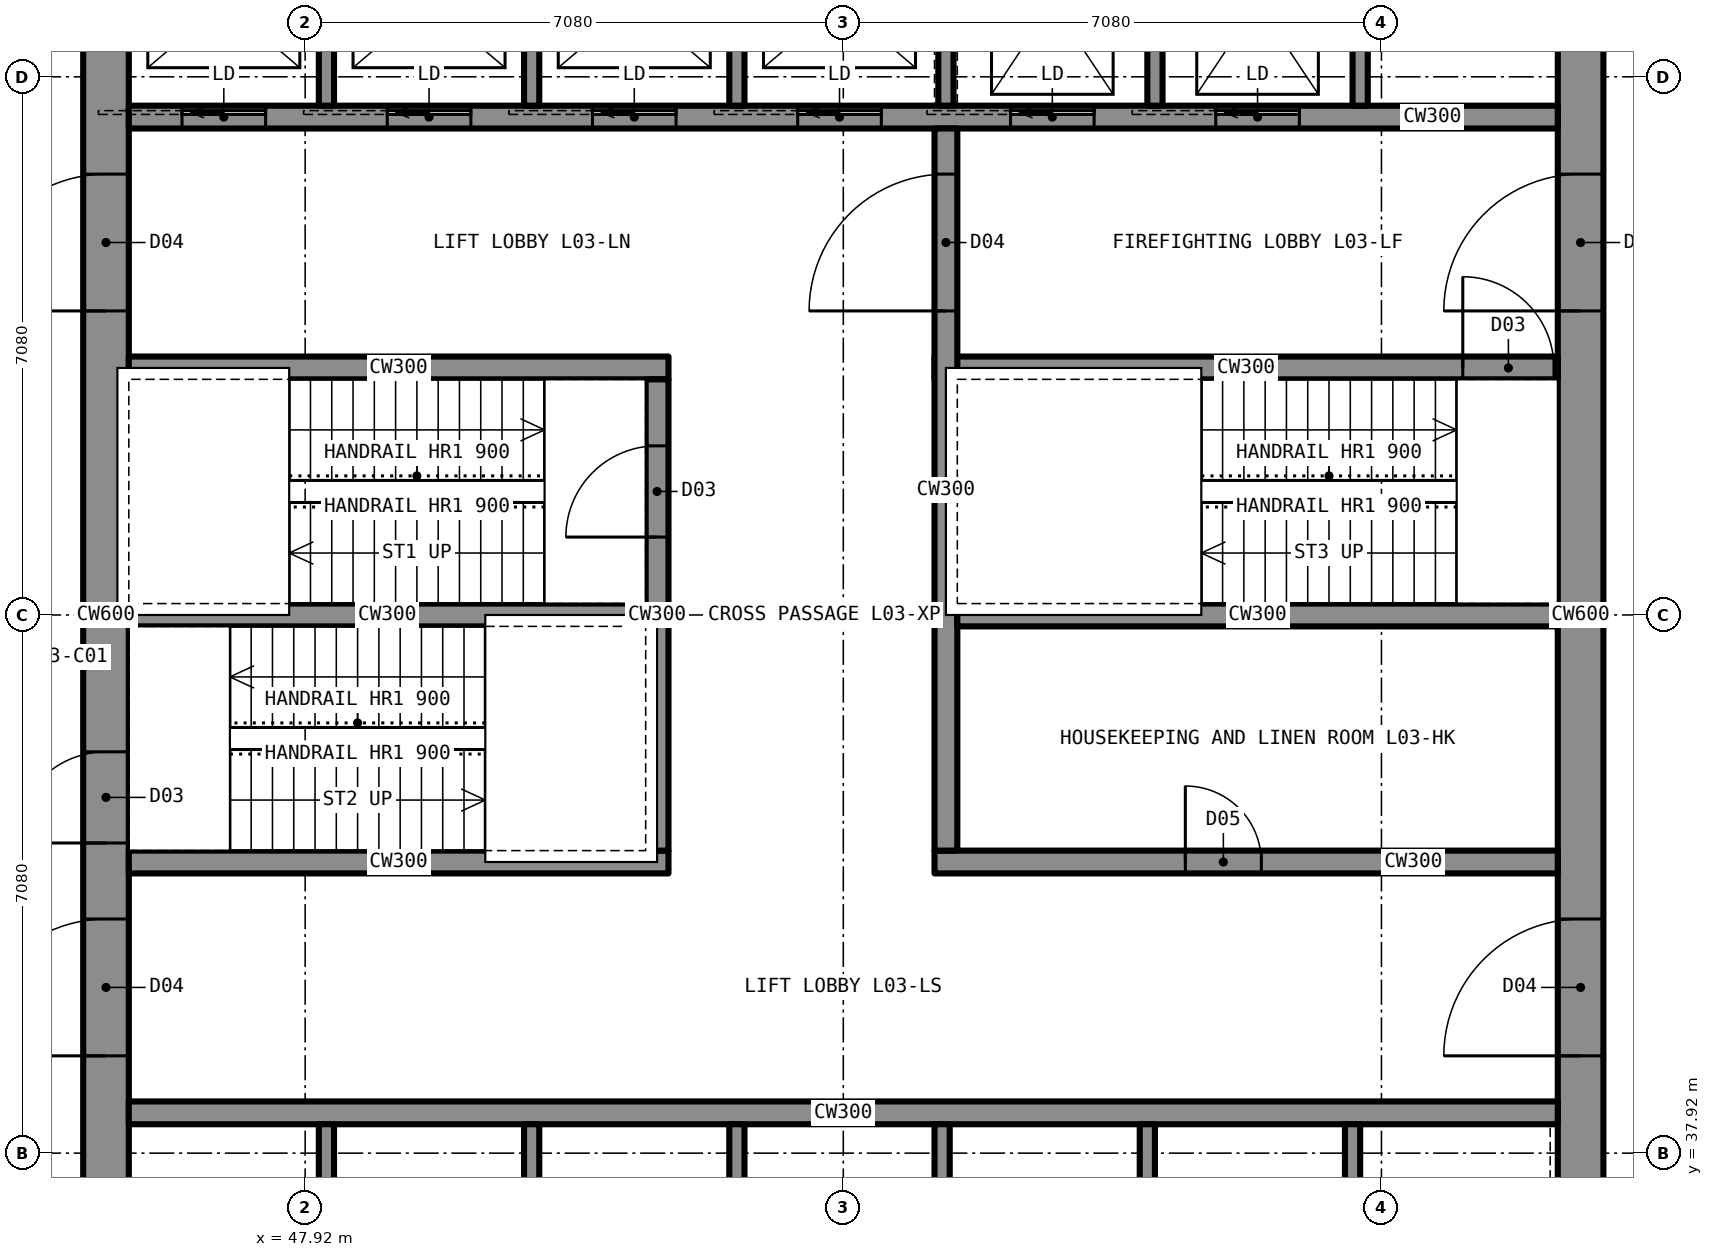
"""IFC4 building model, lengths in metres.
Left out: names, types, materials, properties, quantities, classifications, styles, units other than length and angle.
Written with IfcOpenShell. Run it as: python <this file> out.ifc"""

import sys

from ifc_helpers import new_model, si_unit, direction, frame, frame_2d, origin, place, context, subcontext, project, spatial, rectangle, extrude, element, fill, save


model = new_model("IFC4")
c1 = context("Model", 3, precision=1e-05, world=origin(), true_north=direction((0.0, 1.0)))
c2 = subcontext(c1, "Body", "Model", "MODEL_VIEW")
j1 = project(units=[si_unit("LENGTHUNIT", "METRE"), si_unit("PLANEANGLEUNIT", "RADIAN")], contexts=[c1])
p1 = place(None, origin())
s1 = spatial("IfcSite", under=j1, at=p1, CompositionType="ELEMENT")
p2 = place(p1, origin())
s2 = spatial("IfcBuilding", under=s1, at=p2, CompositionType="ELEMENT")
p3 = place(p2, frame((0.0, 0.0, 16.0)))
s3 = spatial("IfcBuildingStorey", under=s2, at=p3, CompositionType="ELEMENT", Elevation=16.0)
p4 = place(p3, frame((64.7, 35.6, 0.0), z_axis=(0.0, 0.0, 1.0), x_axis=(0.0, 1.0, 0.0)))
e1 = element("IfcWall", 1, at=p4, inside=s3, PredefinedType="SHEAR", context=c2, shape_type="SweptSolid", body=[
    extrude(rectangle(XDim=18.8, YDim=0.6, at=frame_2d((9.4, 0.0))), origin(), (0.0, 0.0, 1.0), 4.5),
])
p5 = place(p4, frame((13.4, 0.0, 0.0)))
e2 = element("IfcOpeningElement", 2, at=p5, cuts=e1, PredefinedType="OPENING", context=c2, shape_type="SweptSolid", body=[
    extrude(rectangle(XDim=1.8, YDim=2.2, at=frame_2d((0.9, 1.1))), frame((0.0, 0.31, 0.0), z_axis=(0.0, -1.0, 0.0), x_axis=(1.0, 0.0, 0.0)), (0.0, 0.0, 1.0), 0.62),
])
p6 = place(p4, frame((3.6, 0.0, 0.0)))
e3 = element("IfcOpeningElement", 3, at=p6, cuts=e1, PredefinedType="OPENING", context=c2, shape_type="SweptSolid", body=[
    extrude(rectangle(XDim=1.8, YDim=2.2, at=frame_2d((0.9, 1.1))), frame((0.0, 0.31, 0.0), z_axis=(0.0, -1.0, 0.0), x_axis=(1.0, 0.0, 0.0)), (0.0, 0.0, 1.0), 0.62),
])
p7 = place(p3, frame((45.3, 35.6, 0.0), z_axis=(0.0, 0.0, 1.0), x_axis=(0.0, 1.0, 0.0)))
e4 = element("IfcWall", 4, at=p7, inside=s3, PredefinedType="SHEAR", context=c2, shape_type="SweptSolid", body=[
    extrude(rectangle(XDim=18.8, YDim=0.6, at=frame_2d((9.4, 0.0))), origin(), (0.0, 0.0, 1.0), 4.5),
])
p8 = place(p7, frame((13.4, 0.0, 0.0)))
e5 = element("IfcOpeningElement", 5, at=p8, cuts=e4, PredefinedType="OPENING", context=c2, shape_type="SweptSolid", body=[
    extrude(rectangle(XDim=1.8, YDim=2.2, at=frame_2d((0.9, 1.1))), frame((0.0, 0.31, 0.0), z_axis=(0.0, -1.0, 0.0), x_axis=(1.0, 0.0, 0.0)), (0.0, 0.0, 1.0), 0.62),
])
p9 = place(p7, frame((3.6, 0.0, 0.0)))
e6 = element("IfcOpeningElement", 6, at=p9, cuts=e4, PredefinedType="OPENING", context=c2, shape_type="SweptSolid", body=[
    extrude(rectangle(XDim=1.8, YDim=2.2, at=frame_2d((0.9, 1.1))), frame((0.0, 0.31, 0.0), z_axis=(0.0, -1.0, 0.0), x_axis=(1.0, 0.0, 0.0)), (0.0, 0.0, 1.0), 0.62),
])
p10 = place(p7, frame((6.4, 0.0, 0.0)))
e7 = element("IfcOpeningElement", 7, at=p10, cuts=e4, PredefinedType="OPENING", context=c2, shape_type="SweptSolid", body=[
    extrude(rectangle(XDim=1.2, YDim=2.2, at=frame_2d((0.6, 1.1))), frame((0.0, 0.31, 0.0), z_axis=(0.0, -1.0, 0.0), x_axis=(1.0, 0.0, 0.0)), (0.0, 0.0, 1.0), 0.62),
])
p11 = place(p3, frame((45.6, 51.55, 0.0), z_axis=(0.0, 0.0, 1.0), x_axis=(1.0, 0.0, 0.0)))
e8 = element("IfcWall", 8, at=p11, inside=s3, PredefinedType="SHEAR", context=c2, shape_type="SweptSolid", body=[
    extrude(rectangle(XDim=18.8, YDim=0.3, at=frame_2d((9.4, 0.0))), origin(), (0.0, 0.0, 1.0), 4.5),
])
p12 = place(p11, frame((0.7, 0.0, 0.0)))
e9 = element("IfcOpeningElement", 9, at=p12, cuts=e8, PredefinedType="OPENING", context=c2, shape_type="SweptSolid", body=[
    extrude(rectangle(XDim=1.1, YDim=2.2, at=frame_2d((0.55, 1.1))), frame((0.0, 0.16, 0.0), z_axis=(0.0, -1.0, 0.0), x_axis=(1.0, 0.0, 0.0)), (0.0, 0.0, 1.0), 0.32),
])
p13 = place(p11, frame((3.4, 0.0, 0.0)))
e10 = element("IfcOpeningElement", 10, at=p13, cuts=e8, PredefinedType="OPENING", context=c2, shape_type="SweptSolid", body=[
    extrude(rectangle(XDim=1.1, YDim=2.2, at=frame_2d((0.55, 1.1))), frame((0.0, 0.16, 0.0), z_axis=(0.0, -1.0, 0.0), x_axis=(1.0, 0.0, 0.0)), (0.0, 0.0, 1.0), 0.32),
])
p14 = place(p11, frame((6.1, 0.0, 0.0)))
e11 = element("IfcOpeningElement", 11, at=p14, cuts=e8, PredefinedType="OPENING", context=c2, shape_type="SweptSolid", body=[
    extrude(rectangle(XDim=1.1, YDim=2.2, at=frame_2d((0.55, 1.1))), frame((0.0, 0.16, 0.0), z_axis=(0.0, -1.0, 0.0), x_axis=(1.0, 0.0, 0.0)), (0.0, 0.0, 1.0), 0.32),
])
p15 = place(p11, frame((8.8, 0.0, 0.0)))
e12 = element("IfcOpeningElement", 12, at=p15, cuts=e8, PredefinedType="OPENING", context=c2, shape_type="SweptSolid", body=[
    extrude(rectangle(XDim=1.1, YDim=2.2, at=frame_2d((0.55, 1.1))), frame((0.0, 0.16, 0.0), z_axis=(0.0, -1.0, 0.0), x_axis=(1.0, 0.0, 0.0)), (0.0, 0.0, 1.0), 0.32),
])
p16 = place(p11, frame((11.6, 0.0, 0.0)))
e13 = element("IfcOpeningElement", 13, at=p16, cuts=e8, PredefinedType="OPENING", context=c2, shape_type="SweptSolid", body=[
    extrude(rectangle(XDim=1.1, YDim=2.2, at=frame_2d((0.55, 1.1))), frame((0.0, 0.16, 0.0), z_axis=(0.0, -1.0, 0.0), x_axis=(1.0, 0.0, 0.0)), (0.0, 0.0, 1.0), 0.32),
])
p17 = place(p11, frame((14.3, 0.0, 0.0)))
e14 = element("IfcOpeningElement", 14, at=p17, cuts=e8, PredefinedType="OPENING", context=c2, shape_type="SweptSolid", body=[
    extrude(rectangle(XDim=1.1, YDim=2.2, at=frame_2d((0.55, 1.1))), frame((0.0, 0.16, 0.0), z_axis=(0.0, -1.0, 0.0), x_axis=(1.0, 0.0, 0.0)), (0.0, 0.0, 1.0), 0.32),
])
p18 = place(p3, frame((45.6, 38.45, 0.0), z_axis=(0.0, 0.0, 1.0), x_axis=(1.0, 0.0, 0.0)))
e15 = element("IfcWall", 15, at=p18, inside=s3, PredefinedType="SHEAR", context=c2, shape_type="SweptSolid", body=[
    extrude(rectangle(XDim=18.8, YDim=0.3, at=frame_2d((9.4, 0.0))), origin(), (0.0, 0.0, 1.0), 4.5),
])
p19 = place(p3, frame((45.6, 48.25, 0.0), z_axis=(0.0, 0.0, 1.0), x_axis=(1.0, 0.0, 0.0)))
e16 = element("IfcWall", 16, at=p19, inside=s3, PredefinedType="SHEAR", context=c2, shape_type="SweptSolid", body=[
    extrude(rectangle(XDim=7.1, YDim=0.3, at=frame_2d((3.55, 0.0))), origin(), (0.0, 0.0, 1.0), 4.5),
])
p20 = place(p3, frame((56.2, 48.25, 0.0), z_axis=(0.0, 0.0, 1.0), x_axis=(1.0, 0.0, 0.0)))
e17 = element("IfcWall", 17, at=p20, inside=s3, PredefinedType="SHEAR", context=c2, shape_type="SweptSolid", body=[
    extrude(rectangle(XDim=8.2, YDim=0.3, at=frame_2d((4.1, 0.0))), origin(), (0.0, 0.0, 1.0), 4.5),
])
p21 = place(p20, frame((6.95, 0.0, 0.0)))
e18 = element("IfcOpeningElement", 18, at=p21, cuts=e17, PredefinedType="OPENING", context=c2, shape_type="SweptSolid", body=[
    extrude(rectangle(XDim=1.2, YDim=2.2, at=frame_2d((0.6, 1.1))), frame((0.0, 0.16, 0.0), z_axis=(0.0, -1.0, 0.0), x_axis=(1.0, 0.0, 0.0)), (0.0, 0.0, 1.0), 0.32),
])
p22 = place(p3, frame((45.6, 41.75, 0.0), z_axis=(0.0, 0.0, 1.0), x_axis=(1.0, 0.0, 0.0)))
e19 = element("IfcWall", 19, at=p22, inside=s3, PredefinedType="SHEAR", context=c2, shape_type="SweptSolid", body=[
    extrude(rectangle(XDim=7.1, YDim=0.3, at=frame_2d((3.55, 0.0))), origin(), (0.0, 0.0, 1.0), 4.5),
])
p23 = place(p3, frame((56.2, 41.75, 0.0), z_axis=(0.0, 0.0, 1.0), x_axis=(1.0, 0.0, 0.0)))
e20 = element("IfcWall", 20, at=p23, inside=s3, PredefinedType="SHEAR", context=c2, shape_type="SweptSolid", body=[
    extrude(rectangle(XDim=8.2, YDim=0.3, at=frame_2d((4.1, 0.0))), origin(), (0.0, 0.0, 1.0), 4.5),
])
p24 = place(p23, frame((3.3, 0.0, 0.0)))
e21 = element("IfcOpeningElement", 21, at=p24, cuts=e20, PredefinedType="OPENING", context=c2, shape_type="SweptSolid", body=[
    extrude(rectangle(XDim=1.0, YDim=2.1, at=frame_2d((0.5, 1.05))), frame((0.0, 0.16, 0.0), z_axis=(0.0, -1.0, 0.0), x_axis=(1.0, 0.0, 0.0)), (0.0, 0.0, 1.0), 0.32),
])
p25 = place(p3, frame((52.55, 41.9, 0.0), z_axis=(0.0, 0.0, 1.0), x_axis=(0.0, 1.0, 0.0)))
e22 = element("IfcWall", 22, at=p25, inside=s3, PredefinedType="SHEAR", context=c2, shape_type="SweptSolid", body=[
    extrude(rectangle(XDim=6.2, YDim=0.3, at=frame_2d((3.1, 0.0))), origin(), (0.0, 0.0, 1.0), 4.5),
])
p26 = place(p25, frame((4.125, 0.0, 0.0)))
e23 = element("IfcOpeningElement", 23, at=p26, cuts=e22, PredefinedType="OPENING", context=c2, shape_type="SweptSolid", body=[
    extrude(rectangle(XDim=1.2, YDim=2.2, at=frame_2d((0.6, 1.1))), frame((0.0, 0.16, 0.0), z_axis=(0.0, -1.0, 0.0), x_axis=(1.0, 0.0, 0.0)), (0.0, 0.0, 1.0), 0.32),
])
p27 = place(p3, frame((56.35, 41.9, 0.0), z_axis=(0.0, 0.0, 1.0), x_axis=(0.0, 1.0, 0.0)))
e24 = element("IfcWall", 24, at=p27, inside=s3, PredefinedType="SHEAR", context=c2, shape_type="SweptSolid", body=[
    extrude(rectangle(XDim=9.5, YDim=0.3, at=frame_2d((4.75, 0.0))), origin(), (0.0, 0.0, 1.0), 4.5),
])
p28 = place(p27, frame((7.1, 0.0, 0.0)))
e25 = element("IfcOpeningElement", 25, at=p28, cuts=e24, PredefinedType="OPENING", context=c2, shape_type="SweptSolid", body=[
    extrude(rectangle(XDim=1.8, YDim=2.2, at=frame_2d((0.9, 1.1))), frame((0.0, 0.16, 0.0), z_axis=(0.0, -1.0, 0.0), x_axis=(1.0, 0.0, 0.0)), (0.0, 0.0, 1.0), 0.32),
])
p29 = place(p3, frame((45.6, 45.0, 0.0), z_axis=(0.0, 0.0, 1.0), x_axis=(1.0, 0.0, 0.0)))
e26 = element("IfcWall", 26, at=p29, inside=s3, PredefinedType="SHEAR", context=c2, shape_type="SweptSolid", body=[
    extrude(rectangle(XDim=6.8, YDim=0.3, at=frame_2d((3.4, 0.0))), origin(), (0.0, 0.0, 1.0), 4.5),
])
p30 = place(p3, frame((56.5, 45.0, 0.0), z_axis=(0.0, 0.0, 1.0), x_axis=(1.0, 0.0, 0.0)))
e27 = element("IfcWall", 27, at=p30, inside=s3, PredefinedType="SHEAR", context=c2, shape_type="SweptSolid", body=[
    extrude(rectangle(XDim=7.9, YDim=0.3, at=frame_2d((3.95, 0.0))), origin(), (0.0, 0.0, 1.0), 4.5),
])
for number, where, z_axis, x_axis in (
    (28, (48.2, 51.7, 0.0), (0.0, 0.0, 1.0), (0.0, 1.0, 0.0)),
    (29, (50.9, 51.7, 0.0), (0.0, 0.0, 1.0), (0.0, 1.0, 0.0)),
    (30, (53.6, 51.7, 0.0), (0.0, 0.0, 1.0), (0.0, 1.0, 0.0)),
    (31, (59.1, 51.7, 0.0), (0.0, 0.0, 1.0), (0.0, 1.0, 0.0)),
    (32, (61.8, 51.7, 0.0), (0.0, 0.0, 1.0), (0.0, 1.0, 0.0)),
    (33, (56.35, 51.7, 0.0), (0.0, 0.0, 1.0), (0.0, 1.0, 0.0)),
    (34, (48.2, 35.6, 0.0), (0.0, 0.0, 1.0), (0.0, 1.0, 0.0)),
    (35, (50.9, 35.6, 0.0), (0.0, 0.0, 1.0), (0.0, 1.0, 0.0)),
    (36, (53.6, 35.6, 0.0), (0.0, 0.0, 1.0), (0.0, 1.0, 0.0)),
    (37, (56.3, 35.6, 0.0), (0.0, 0.0, 1.0), (0.0, 1.0, 0.0)),
    (38, (59.0, 35.6, 0.0), (0.0, 0.0, 1.0), (0.0, 1.0, 0.0)),
    (39, (61.7, 35.6, 0.0), (0.0, 0.0, 1.0), (0.0, 1.0, 0.0)),
):
    element("IfcWall", number, at=place(p3, frame(where, z_axis=z_axis, x_axis=x_axis)), inside=s3, PredefinedType="PARTITIONING", context=c2, shape_type="SweptSolid", body=[
        extrude(rectangle(XDim=2.7, YDim=0.2, at=frame_2d((1.35, 0.0))), origin(), (0.0, 0.0, 1.0), 4.15),
    ])
p31 = place(p8, origin())
e40 = element("IfcDoor", 40, at=p31, inside=s3, OperationType="DOUBLE_DOOR_SINGLE_SWING", PredefinedType="DOOR", context=c2, shape_type="SweptSolid", body=[
    extrude(rectangle(XDim=1.8, YDim=2.2, at=frame_2d((0.9, 1.1))), frame((0.0, 0.025, 0.0), z_axis=(0.0, -1.0, 0.0), x_axis=(1.0, 0.0, 0.0)), (0.0, 0.0, 1.0), 0.05),
])
fill(e5, e40)
p32 = place(p9, origin())
e41 = element("IfcDoor", 41, at=p32, inside=s3, OperationType="DOUBLE_DOOR_SINGLE_SWING", PredefinedType="DOOR", context=c2, shape_type="SweptSolid", body=[
    extrude(rectangle(XDim=1.8, YDim=2.2, at=frame_2d((0.9, 1.1))), frame((0.0, 0.025, 0.0), z_axis=(0.0, -1.0, 0.0), x_axis=(1.0, 0.0, 0.0)), (0.0, 0.0, 1.0), 0.05),
])
fill(e6, e41)
p33 = place(p5, origin())
e42 = element("IfcDoor", 42, at=p33, inside=s3, OperationType="DOUBLE_DOOR_SINGLE_SWING", PredefinedType="DOOR", context=c2, shape_type="SweptSolid", body=[
    extrude(rectangle(XDim=1.8, YDim=2.2, at=frame_2d((0.9, 1.1))), frame((0.0, 0.025, 0.0), z_axis=(0.0, -1.0, 0.0), x_axis=(1.0, 0.0, 0.0)), (0.0, 0.0, 1.0), 0.05),
])
fill(e2, e42)
p34 = place(p6, origin())
e43 = element("IfcDoor", 43, at=p34, inside=s3, OperationType="DOUBLE_DOOR_SINGLE_SWING", PredefinedType="DOOR", context=c2, shape_type="SweptSolid", body=[
    extrude(rectangle(XDim=1.8, YDim=2.2, at=frame_2d((0.9, 1.1))), frame((0.0, 0.025, 0.0), z_axis=(0.0, -1.0, 0.0), x_axis=(1.0, 0.0, 0.0)), (0.0, 0.0, 1.0), 0.05),
])
fill(e3, e43)
p35 = place(p28, origin())
e44 = element("IfcDoor", 44, at=p35, inside=s3, OperationType="DOUBLE_DOOR_SINGLE_SWING", PredefinedType="DOOR", context=c2, shape_type="SweptSolid", body=[
    extrude(rectangle(XDim=1.8, YDim=2.2, at=frame_2d((0.9, 1.1))), frame((0.0, 0.025, 0.0), z_axis=(0.0, -1.0, 0.0), x_axis=(1.0, 0.0, 0.0)), (0.0, 0.0, 1.0), 0.05),
])
fill(e25, e44)
p36 = place(p26, origin())
e45 = element("IfcDoor", 45, at=p36, inside=s3, OperationType="SINGLE_SWING_LEFT", PredefinedType="DOOR", context=c2, shape_type="SweptSolid", body=[
    extrude(rectangle(XDim=1.2, YDim=2.2, at=frame_2d((0.6, 1.1))), frame((0.0, 0.025, 0.0), z_axis=(0.0, -1.0, 0.0), x_axis=(1.0, 0.0, 0.0)), (0.0, 0.0, 1.0), 0.05),
])
fill(e23, e45)
p37 = place(p10, origin())
e46 = element("IfcDoor", 46, at=p37, inside=s3, OperationType="SINGLE_SWING_LEFT", PredefinedType="DOOR", context=c2, shape_type="SweptSolid", body=[
    extrude(rectangle(XDim=1.2, YDim=2.2, at=frame_2d((0.6, 1.1))), frame((0.0, 0.025, 0.0), z_axis=(0.0, -1.0, 0.0), x_axis=(1.0, 0.0, 0.0)), (0.0, 0.0, 1.0), 0.05),
])
fill(e7, e46)
p38 = place(p21, origin())
e47 = element("IfcDoor", 47, at=p38, inside=s3, OperationType="SINGLE_SWING_LEFT", PredefinedType="DOOR", context=c2, shape_type="SweptSolid", body=[
    extrude(rectangle(XDim=1.2, YDim=2.2, at=frame_2d((0.6, 1.1))), frame((0.0, 0.025, 0.0), z_axis=(0.0, -1.0, 0.0), x_axis=(1.0, 0.0, 0.0)), (0.0, 0.0, 1.0), 0.05),
])
fill(e18, e47)
p39 = place(p24, origin())
e48 = element("IfcDoor", 48, at=p39, inside=s3, OperationType="SINGLE_SWING_LEFT", PredefinedType="DOOR", context=c2, shape_type="SweptSolid", body=[
    extrude(rectangle(XDim=1.0, YDim=2.1, at=frame_2d((0.5, 1.05))), frame((0.0, 0.025, 0.0), z_axis=(0.0, -1.0, 0.0), x_axis=(1.0, 0.0, 0.0)), (0.0, 0.0, 1.0), 0.05),
])
fill(e21, e48)
p40 = place(p12, origin())
e49 = element("IfcDoor", 49, at=p40, inside=s3, OperationType="SLIDING_TO_LEFT", PredefinedType="DOOR", context=c2, shape_type="SweptSolid", body=[
    extrude(rectangle(XDim=1.1, YDim=2.2, at=frame_2d((0.55, 1.1))), frame((0.0, 0.025, 0.0), z_axis=(0.0, -1.0, 0.0), x_axis=(1.0, 0.0, 0.0)), (0.0, 0.0, 1.0), 0.05),
])
fill(e9, e49)
p41 = place(p13, origin())
e50 = element("IfcDoor", 50, at=p41, inside=s3, OperationType="SLIDING_TO_LEFT", PredefinedType="DOOR", context=c2, shape_type="SweptSolid", body=[
    extrude(rectangle(XDim=1.1, YDim=2.2, at=frame_2d((0.55, 1.1))), frame((0.0, 0.025, 0.0), z_axis=(0.0, -1.0, 0.0), x_axis=(1.0, 0.0, 0.0)), (0.0, 0.0, 1.0), 0.05),
])
fill(e10, e50)
p42 = place(p14, origin())
e51 = element("IfcDoor", 51, at=p42, inside=s3, OperationType="SLIDING_TO_LEFT", PredefinedType="DOOR", context=c2, shape_type="SweptSolid", body=[
    extrude(rectangle(XDim=1.1, YDim=2.2, at=frame_2d((0.55, 1.1))), frame((0.0, 0.025, 0.0), z_axis=(0.0, -1.0, 0.0), x_axis=(1.0, 0.0, 0.0)), (0.0, 0.0, 1.0), 0.05),
])
fill(e11, e51)
p43 = place(p15, origin())
e52 = element("IfcDoor", 52, at=p43, inside=s3, OperationType="SLIDING_TO_LEFT", PredefinedType="DOOR", context=c2, shape_type="SweptSolid", body=[
    extrude(rectangle(XDim=1.1, YDim=2.2, at=frame_2d((0.55, 1.1))), frame((0.0, 0.025, 0.0), z_axis=(0.0, -1.0, 0.0), x_axis=(1.0, 0.0, 0.0)), (0.0, 0.0, 1.0), 0.05),
])
fill(e12, e52)
p44 = place(p16, origin())
e53 = element("IfcDoor", 53, at=p44, inside=s3, OperationType="SLIDING_TO_LEFT", PredefinedType="DOOR", context=c2, shape_type="SweptSolid", body=[
    extrude(rectangle(XDim=1.1, YDim=2.2, at=frame_2d((0.55, 1.1))), frame((0.0, 0.025, 0.0), z_axis=(0.0, -1.0, 0.0), x_axis=(1.0, 0.0, 0.0)), (0.0, 0.0, 1.0), 0.05),
])
fill(e13, e53)
p45 = place(p17, origin())
e54 = element("IfcDoor", 54, at=p45, inside=s3, OperationType="SLIDING_TO_LEFT", PredefinedType="DOOR", context=c2, shape_type="SweptSolid", body=[
    extrude(rectangle(XDim=1.1, YDim=2.2, at=frame_2d((0.55, 1.1))), frame((0.0, 0.025, 0.0), z_axis=(0.0, -1.0, 0.0), x_axis=(1.0, 0.0, 0.0)), (0.0, 0.0, 1.0), 0.05),
])
fill(e14, e54)
save(model, sys.argv[1])
